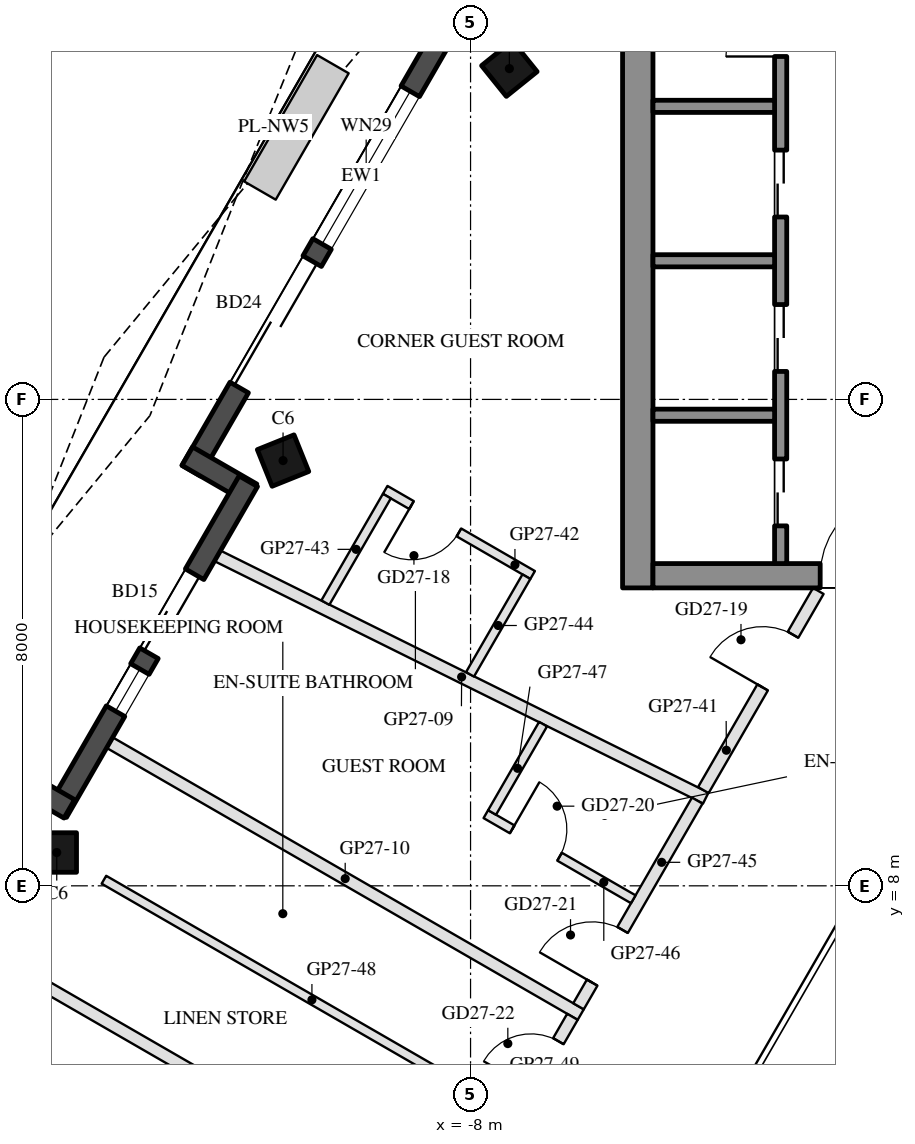
"""IFC4 building model, lengths in metres.
Left out: names, types, materials, properties, quantities, classifications, styles, units other than length and angle.
Written with IfcOpenShell. Run it as: python <this file> out.ifc"""

import sys

from ifc_helpers import new_model, si_unit, direction, frame, frame_2d, origin, origin_2d, place, context, subcontext, project, spatial, rectangle, hollow_rectangle, extrude, boolean, halfspace, element, fill, save


model = new_model("IFC4")
c1 = context("Model", 3, precision=1e-05, world=origin(), true_north=direction((0.0, 1.0)))
c2 = subcontext(c1, "Body", "Model", "MODEL_VIEW")
j1 = project(units=[si_unit("LENGTHUNIT", "METRE"), si_unit("PLANEANGLEUNIT", "RADIAN")], contexts=[c1])
p1 = place(None, origin())
s1 = spatial("IfcSite", under=j1, at=p1, CompositionType="ELEMENT")
p2 = place(p1, origin())
s2 = spatial("IfcBuilding", under=s1, at=p2, CompositionType="ELEMENT")
p3 = place(p2, frame((0.0, 0.0, 276.3)))
s3 = spatial("IfcBuildingStorey", under=s2, at=p3, CompositionType="ELEMENT", Elevation=276.3)
p4 = place(p3, frame((-7.362, 21.44, 0.0), z_axis=(0.06966478086, -0.179988931962, 0.981198656073), x_axis=(0.504437272402, 0.854926536661, 0.121010971086)))
e1 = element("IfcColumn", 1, at=p4, inside=s3, PredefinedType="COLUMN", context=c2, shape_type="SweptSolid", body=[
    boolean("DIFFERENCE", boolean("DIFFERENCE", extrude(hollow_rectangle(XDim=0.65, YDim=0.65, WallThickness=0.03, at=origin_2d()), origin(), (0.0, 0.0, 1.0), 3.771), halfspace(frame((0.0, 0.0, 0.047), z_axis=(0.0, 0.0, 1.0), x_axis=(1.0, 0.0, 0.0)), True)), halfspace(frame((0.0, 0.0, 3.724), z_axis=(0.0, 0.0, 1.0), x_axis=(1.0, 0.0, 0.0)), False)),
])
p5 = place(p3, frame((-11.083, 14.994, 0.0), z_axis=(0.100518021011, -0.128316722417, 0.98662604172), x_axis=(0.503129383785, 0.862065632243, 0.060857775822)))
e2 = element("IfcColumn", 2, at=p5, inside=s3, PredefinedType="COLUMN", context=c2, shape_type="SweptSolid", body=[
    boolean("DIFFERENCE", boolean("DIFFERENCE", extrude(hollow_rectangle(XDim=0.65, YDim=0.65, WallThickness=0.03, at=origin_2d()), origin(), (0.0, 0.0, 1.0), 3.75), halfspace(frame((0.0, 0.0, 0.04), z_axis=(0.0, 0.0, 1.0), x_axis=(1.0, 0.0, 0.0)), True)), halfspace(frame((0.0, 0.0, 3.71), z_axis=(0.0, 0.0, 1.0), x_axis=(1.0, 0.0, 0.0)), False)),
])
p6 = place(p3, frame((-14.805, 8.548, 0.0), z_axis=(0.131228839908, -0.075723997581, 0.988455799602), x_axis=(-0.499841813697, -0.866116713392, 7.933019e-06)))
e3 = element("IfcColumn", 3, at=p6, inside=s3, PredefinedType="COLUMN", context=c2, shape_type="SweptSolid", body=[
    boolean("DIFFERENCE", boolean("DIFFERENCE", extrude(hollow_rectangle(XDim=0.65, YDim=0.65, WallThickness=0.03, at=origin_2d()), origin(), (0.0, 0.0, 1.0), 3.743), halfspace(frame((0.0, 0.0, 0.037), z_axis=(0.0, 0.0, 1.0), x_axis=(1.0, 0.0, 0.0)), True)), halfspace(frame((0.0, 0.0, 3.706), z_axis=(0.0, 0.0, 1.0), x_axis=(1.0, 0.0, 0.0)), False)),
])
p7 = place(p3, frame((-7.002, 24.514, 0.0), z_axis=(0.0, 0.0, 1.0), x_axis=(-0.500000830309, -0.866024924405, 0.0)))
e4 = element("IfcWall", 4, at=p7, inside=s3, PredefinedType="SOLIDWALL", context=c2, shape_type="SweptSolid", body=[
    extrude(rectangle(XDim=11.185, YDim=0.35, at=frame_2d((5.593, 0.0))), origin(), (0.0, 0.0, 1.0), 3.55),
])
p8 = place(p7, frame((0.979, 0.0, 0.3)))
e5 = element("IfcOpeningElement", 5, at=p8, cuts=e4, PredefinedType="OPENING", context=c2, shape_type="SweptSolid", body=[
    extrude(rectangle(XDim=1.1, YDim=2.65, at=frame_2d((0.55, 1.325))), frame((0.0, 0.185, 0.0), z_axis=(0.0, -1.0, 0.0), x_axis=(1.0, 0.0, 0.0)), (0.0, 0.0, 1.0), 0.37),
])
p9 = place(p7, frame((7.205, 0.0, 0.0)))
e6 = element("IfcOpeningElement", 6, at=p9, cuts=e4, PredefinedType="OPENING", context=c2, shape_type="SweptSolid", body=[
    extrude(rectangle(XDim=2.4, YDim=2.4, at=frame_2d((1.2, 1.2))), frame((0.0, 0.185, 0.0), z_axis=(0.0, -1.0, 0.0), x_axis=(1.0, 0.0, 0.0)), (0.0, 0.0, 1.0), 0.37),
])
p10 = place(p7, frame((3.979, 0.0, 0.3)))
e7 = element("IfcOpeningElement", 7, at=p10, cuts=e4, PredefinedType="OPENING", context=c2, shape_type="SweptSolid", body=[
    extrude(rectangle(XDim=2.9, YDim=2.65, at=frame_2d((1.45, 1.325))), frame((0.0, 0.185, 0.0), z_axis=(0.0, -1.0, 0.0), x_axis=(1.0, 0.0, 0.0)), (0.0, 0.0, 1.0), 0.37),
])
p11 = place(p3, frame((-12.659, 15.066, 0.0), z_axis=(0.0, 0.0, 1.0), x_axis=(0.866005645448, -0.500034220881, 0.0)))
e8 = element("IfcWall", 8, at=p11, inside=s3, PredefinedType="SOLIDWALL", context=c2, shape_type="SweptSolid", body=[
    extrude(rectangle(XDim=1.22, YDim=0.35, at=frame_2d((0.61, 0.0))), origin(), (0.0, 0.0, 1.0), 3.55),
])
p12 = place(p3, frame((-11.655, 14.655, 0.0), z_axis=(0.0, 0.0, 1.0), x_axis=(-0.499995993298, -0.866027717042, 0.0)))
e9 = element("IfcWall", 9, at=p12, inside=s3, PredefinedType="SOLIDWALL", context=c2, shape_type="SweptSolid", body=[
    extrude(rectangle(XDim=6.284, YDim=0.35, at=frame_2d((3.142, 0.0))), origin(), (0.0, 0.0, 1.0), 3.55),
])
p13 = place(p12, frame((1.767, 0.0, 0.0)))
e10 = element("IfcOpeningElement", 10, at=p13, cuts=e9, PredefinedType="OPENING", context=c2, shape_type="SweptSolid", body=[
    extrude(rectangle(XDim=1.5, YDim=2.4, at=frame_2d((0.75, 1.2))), frame((0.0, 0.185, 0.0), z_axis=(0.0, -1.0, 0.0), x_axis=(1.0, 0.0, 0.0)), (0.0, 0.0, 1.0), 0.37),
])
p14 = place(p12, frame((3.566, 0.0, 0.3)))
e11 = element("IfcOpeningElement", 11, at=p14, cuts=e9, PredefinedType="OPENING", context=c2, shape_type="SweptSolid", body=[
    extrude(rectangle(XDim=0.8, YDim=2.65, at=frame_2d((0.4, 1.325))), frame((0.0, 0.185, 0.0), z_axis=(0.0, -1.0, 0.0), x_axis=(1.0, 0.0, 0.0)), (0.0, 0.0, 1.0), 0.37),
])
p15 = place(p3, frame((-14.599, 9.266, 0.0), z_axis=(0.0, 0.0, 1.0), x_axis=(-0.866005645448, 0.500034220881, 0.0)))
e12 = element("IfcWall", 12, at=p15, inside=s3, PredefinedType="SOLIDWALL", context=c2, shape_type="SweptSolid", body=[
    extrude(rectangle(XDim=1.22, YDim=0.35, at=frame_2d((0.61, 0.0))), origin(), (0.0, 0.0, 1.0), 3.55),
])
p16 = place(p3, frame((-5.25, 12.9, 0.0), z_axis=(0.0, 0.0, 1.0), x_axis=(0.0, 1.0, 0.0)))
e13 = element("IfcWall", 13, at=p16, inside=s3, PredefinedType="SHEAR", context=c2, shape_type="SweptSolid", body=[
    extrude(rectangle(XDim=13.031, YDim=0.5, at=frame_2d((6.516, 0.0))), origin(), (0.0, 0.0, 1.0), 3.5),
])
p17 = place(p3, frame((5.0, 13.1, 0.0), z_axis=(0.0, 0.0, 1.0), x_axis=(-1.0, 0.0, 0.0)))
e14 = element("IfcWall", 14, at=p17, inside=s3, PredefinedType="SHEAR", context=c2, shape_type="SweptSolid", body=[
    extrude(rectangle(XDim=10.0, YDim=0.4, at=frame_2d((5.0, 0.0))), origin(), (0.0, 0.0, 1.0), 3.5),
])
p18 = place(p17, frame((3.55, 0.0, 0.0)))
e15 = element("IfcOpeningElement", 15, at=p18, cuts=e14, PredefinedType="OPENING", context=c2, shape_type="SweptSolid", body=[
    extrude(rectangle(XDim=1.1, YDim=2.1, at=frame_2d((0.55, 1.05))), frame((0.0, 0.21, 0.0), z_axis=(0.0, -1.0, 0.0), x_axis=(1.0, 0.0, 0.0)), (0.0, 0.0, 1.0), 0.42),
])
p19 = place(p17, frame((5.85, 0.0, 0.0)))
e16 = element("IfcOpeningElement", 16, at=p19, cuts=e14, PredefinedType="OPENING", context=c2, shape_type="SweptSolid", body=[
    extrude(rectangle(XDim=1.4, YDim=2.1, at=frame_2d((0.7, 1.05))), frame((0.0, 0.21, 0.0), z_axis=(0.0, -1.0, 0.0), x_axis=(1.0, 0.0, 0.0)), (0.0, 0.0, 1.0), 0.42),
])
p20 = place(p3, frame((-2.9, 13.3, 0.0), z_axis=(0.0, 0.0, 1.0), x_axis=(0.0, 1.0, 0.0)))
e17 = element("IfcWall", 17, at=p20, inside=s3, PredefinedType="SHEAR", context=c2, shape_type="SweptSolid", body=[
    extrude(rectangle(XDim=10.16, YDim=0.2, at=frame_2d((5.08, 0.0))), origin(), (0.0, 0.0, 1.0), 3.5),
])
p21 = place(p20, frame((0.62, 0.0, 0.0)))
e18 = element("IfcOpeningElement", 18, at=p21, cuts=e17, PredefinedType="OPENING", context=c2, shape_type="SweptSolid", body=[
    extrude(rectangle(XDim=1.1, YDim=2.1, at=frame_2d((0.55, 1.05))), frame((0.0, 0.11, 0.0), z_axis=(0.0, -1.0, 0.0), x_axis=(1.0, 0.0, 0.0)), (0.0, 0.0, 1.0), 0.22),
])
p22 = place(p20, frame((3.16, 0.0, 0.0)))
e19 = element("IfcOpeningElement", 19, at=p22, cuts=e17, PredefinedType="OPENING", context=c2, shape_type="SweptSolid", body=[
    extrude(rectangle(XDim=1.1, YDim=2.1, at=frame_2d((0.55, 1.05))), frame((0.0, 0.11, 0.0), z_axis=(0.0, -1.0, 0.0), x_axis=(1.0, 0.0, 0.0)), (0.0, 0.0, 1.0), 0.22),
])
p23 = place(p20, frame((5.7, 0.0, 0.0)))
e20 = element("IfcOpeningElement", 20, at=p23, cuts=e17, PredefinedType="OPENING", context=c2, shape_type="SweptSolid", body=[
    extrude(rectangle(XDim=1.1, YDim=2.1, at=frame_2d((0.55, 1.05))), frame((0.0, 0.11, 0.0), z_axis=(0.0, -1.0, 0.0), x_axis=(1.0, 0.0, 0.0)), (0.0, 0.0, 1.0), 0.22),
])
p24 = place(p20, frame((8.34, 0.0, 0.0)))
e21 = element("IfcOpeningElement", 21, at=p24, cuts=e17, PredefinedType="OPENING", context=c2, shape_type="SweptSolid", body=[
    extrude(rectangle(XDim=0.9, YDim=2.1, at=frame_2d((0.45, 1.05))), frame((0.0, 0.11, 0.0), z_axis=(0.0, -1.0, 0.0), x_axis=(1.0, 0.0, 0.0)), (0.0, 0.0, 1.0), 0.22),
])
for number, where, z_axis, x_axis in (
    (22, (-3.0, 15.74, 0.0), (0.0, 0.0, 1.0), (-1.0, 0.0, 0.0)),
    (23, (-3.0, 18.28, 0.0), (0.0, 0.0, 1.0), (-1.0, 0.0, 0.0)),
    (24, (-3.0, 20.82, 0.0), (0.0, 0.0, 1.0), (-1.0, 0.0, 0.0)),
):
    element("IfcWall", number, at=place(p3, frame(where, z_axis=z_axis, x_axis=x_axis)), inside=s3, PredefinedType="SHEAR", context=c2, shape_type="SweptSolid", body=[
        extrude(rectangle(XDim=2.0, YDim=0.2, at=frame_2d((1.0, 0.0))), origin(), (0.0, 0.0, 1.0), 3.5),
    ])
p25 = place(p3, frame((-12.162, 13.427, 0.0), z_axis=(0.0, 0.0, 1.0), x_axis=(0.895849808174, -0.444356974959, 0.0)))
e25 = element("IfcWall", 25, at=p25, inside=s3, PredefinedType="PARTITIONING", context=c2, shape_type="SweptSolid", body=[
    extrude(rectangle(XDim=8.964, YDim=0.2, at=frame_2d((4.482, 0.0))), origin(), (0.0, 0.0, 1.0), 3.1),
])
p26 = place(p3, frame((-13.935, 10.355, 0.0), z_axis=(0.0, 0.0, 1.0), x_axis=(0.866026066645, -0.499998851889, 0.0)))
e26 = element("IfcWall", 26, at=p26, inside=s3, PredefinedType="PARTITIONING", context=c2, shape_type="SweptSolid", body=[
    extrude(rectangle(XDim=8.946, YDim=0.2, at=frame_2d((4.473, 0.0))), origin(), (0.0, 0.0, 1.0), 3.1),
])
p27 = place(p3, frame((-16.715, 7.341, 0.0), z_axis=(0.0, 0.0, 1.0), x_axis=(0.866024954444, -0.500000778279, 0.0)))
e27 = element("IfcWall", 27, at=p27, inside=s3, PredefinedType="PARTITIONING", context=c2, shape_type="SweptSolid", body=[
    extrude(rectangle(XDim=9.846, YDim=0.2, at=frame_2d((4.923, 0.0))), origin(), (0.0, 0.0, 1.0), 3.1),
])
p28 = place(p3, frame((-4.171, 9.575, 0.0), z_axis=(0.0, 0.0, 1.0), x_axis=(0.49999255039, 0.866029704776, 0.0)))
e28 = element("IfcWall", 28, at=p28, inside=s3, PredefinedType="PARTITIONING", context=c2, shape_type="SweptSolid", body=[
    extrude(rectangle(XDim=3.782, YDim=0.2, at=frame_2d((1.891, 0.0))), origin(), (0.0, 0.0, 1.0), 3.05),
])
p29 = place(p28, frame((1.95, 0.0, 0.0)))
e29 = element("IfcOpeningElement", 29, at=p29, cuts=e28, PredefinedType="OPENING", context=c2, shape_type="SweptSolid", body=[
    extrude(rectangle(XDim=1.0, YDim=2.1, at=frame_2d((0.5, 1.05))), frame((0.0, 0.11, 0.0), z_axis=(0.0, -1.0, 0.0), x_axis=(1.0, 0.0, 0.0)), (0.0, 0.0, 1.0), 0.22),
])
p30 = place(p3, frame((-6.979, 13.112, 0.0), z_axis=(0.0, 0.0, 1.0), x_axis=(-0.865996816683, 0.500049511043, 0.0)))
e30 = element("IfcWall", 30, at=p30, inside=s3, PredefinedType="PARTITIONING", context=c2, shape_type="SweptSolid", body=[
    extrude(rectangle(XDim=2.8, YDim=0.15, at=frame_2d((1.4, 0.0))), origin(), (0.0, 0.0, 1.0), 3.55),
])
p31 = place(p30, frame((1.4, 0.0, 0.0)))
e31 = element("IfcOpeningElement", 31, at=p31, cuts=e30, PredefinedType="OPENING", context=c2, shape_type="SweptSolid", body=[
    extrude(rectangle(XDim=0.9, YDim=2.1, at=frame_2d((0.45, 1.05))), frame((0.0, 0.085, 0.0), z_axis=(0.0, -1.0, 0.0), x_axis=(1.0, 0.0, 0.0)), (0.0, 0.0, 1.0), 0.17),
])
p32 = place(p3, frame((-9.376, 14.41, 0.0), z_axis=(0.0, 0.0, 1.0), x_axis=(-0.499917528438, -0.866073013527, 0.0)))
e32 = element("IfcWall", 32, at=p32, inside=s3, PredefinedType="PARTITIONING", context=c2, shape_type="SweptSolid", body=[
    extrude(rectangle(XDim=2.022, YDim=0.15, at=frame_2d((1.011, 0.0))), origin(), (0.0, 0.0, 1.0), 3.05),
])
p33 = place(p3, frame((-7.081, 13.085, 0.0), z_axis=(0.0, 0.0, 1.0), x_axis=(-0.500060473882, -0.865990486357, 0.0)))
e33 = element("IfcWall", 33, at=p33, inside=s3, PredefinedType="PARTITIONING", context=c2, shape_type="SweptSolid", body=[
    extrude(rectangle(XDim=1.855, YDim=0.15, at=frame_2d((0.927, 0.0))), origin(), (0.0, 0.0, 1.0), 3.05),
])
p34 = place(p3, frame((-6.225, 6.019, 0.0), z_axis=(0.0, 0.0, 1.0), x_axis=(0.500011000363, 0.866019052629, 0.0)))
e34 = element("IfcWall", 34, at=p34, inside=s3, PredefinedType="PARTITIONING", context=c2, shape_type="SweptSolid", body=[
    extrude(rectangle(XDim=3.906, YDim=0.2, at=frame_2d((1.953, 0.0))), origin(), (0.0, 0.0, 1.0), 3.05),
])
p35 = place(p34, frame((0.45, 0.0, 0.0)))
e35 = element("IfcOpeningElement", 35, at=p35, cuts=e34, PredefinedType="OPENING", context=c2, shape_type="SweptSolid", body=[
    extrude(rectangle(XDim=1.0, YDim=2.1, at=frame_2d((0.5, 1.05))), frame((0.0, 0.11, 0.0), z_axis=(0.0, -1.0, 0.0), x_axis=(1.0, 0.0, 0.0)), (0.0, 0.0, 1.0), 0.22),
])
p36 = place(p3, frame((-7.749, 9.179, 0.0), z_axis=(0.0, 0.0, 1.0), x_axis=(0.866018616679, -0.500011755427, 0.0)))
e36 = element("IfcWall", 36, at=p36, inside=s3, PredefinedType="PARTITIONING", context=c2, shape_type="SweptSolid", body=[
    extrude(rectangle(XDim=2.8, YDim=0.15, at=frame_2d((1.4, 0.0))), origin(), (0.0, 0.0, 1.0), 3.55),
])
p37 = place(p36, frame((0.5, 0.0, 0.0)))
e37 = element("IfcOpeningElement", 37, at=p37, cuts=e36, PredefinedType="OPENING", context=c2, shape_type="SweptSolid", body=[
    extrude(rectangle(XDim=0.9, YDim=2.1, at=frame_2d((0.45, 1.05))), frame((0.0, 0.085, 0.0), z_axis=(0.0, -1.0, 0.0), x_axis=(1.0, 0.0, 0.0)), (0.0, 0.0, 1.0), 0.17),
])
p38 = place(p3, frame((-6.807, 10.659, 0.0), z_axis=(0.0, 0.0, 1.0), x_axis=(-0.500020578564, -0.866013522419, 0.0)))
e38 = element("IfcWall", 38, at=p38, inside=s3, PredefinedType="PARTITIONING", context=c2, shape_type="SweptSolid", body=[
    extrude(rectangle(XDim=1.678, YDim=0.15, at=frame_2d((0.839, 0.0))), origin(), (0.0, 0.0, 1.0), 3.55),
])
p39 = place(p3, frame((-14.03, 8.1, 0.0), z_axis=(0.0, 0.0, 1.0), x_axis=(0.866013180616, -0.500021170551, 0.0)))
e39 = element("IfcWall", 39, at=p39, inside=s3, PredefinedType="PARTITIONING", context=c2, shape_type="SweptSolid", body=[
    extrude(rectangle(XDim=7.9, YDim=0.15, at=frame_2d((3.95, 0.0))), origin(), (0.0, 0.0, 1.0), 3.05),
])
p40 = place(p3, frame((-7.237, 4.265, 0.0), z_axis=(0.0, 0.0, 1.0), x_axis=(0.499923179218, 0.866069751741, 0.0)))
e40 = element("IfcWall", 40, at=p40, inside=s3, PredefinedType="PARTITIONING", context=c2, shape_type="SweptSolid", body=[
    extrude(rectangle(XDim=1.825, YDim=0.2, at=frame_2d((0.913, 0.0))), origin(), (0.0, 0.0, 1.0), 3.05),
])
p41 = place(p40, frame((0.462, 0.0, 0.0)))
e41 = element("IfcOpeningElement", 41, at=p41, cuts=e40, PredefinedType="OPENING", context=c2, shape_type="SweptSolid", body=[
    extrude(rectangle(XDim=0.9, YDim=2.1, at=frame_2d((0.45, 1.05))), frame((0.0, 0.11, 0.0), z_axis=(0.0, -1.0, 0.0), x_axis=(1.0, 0.0, 0.0)), (0.0, 0.0, 1.0), 0.22),
])
p42 = place(p9, frame((2.4, 0.0, 0.0), z_axis=(0.0, 0.0, 1.0), x_axis=(-1.0, 0.0, 0.0)))
e42 = element("IfcDoor", 42, at=p42, inside=s3, OperationType="SLIDING_TO_LEFT", PredefinedType="DOOR", context=c2, shape_type="SweptSolid", body=[
    extrude(rectangle(XDim=2.4, YDim=2.4, at=frame_2d((1.2, 1.2))), frame((0.0, 0.025, 0.0), z_axis=(0.0, -1.0, 0.0), x_axis=(1.0, 0.0, 0.0)), (0.0, 0.0, 1.0), 0.05),
])
fill(e6, e42)
p43 = place(p10, origin())
e43 = element("IfcWindow", 43, at=p43, inside=s3, PartitioningType="SINGLE_PANEL", PredefinedType="WINDOW", context=c2, shape_type="SweptSolid", body=[
    extrude(rectangle(XDim=2.9, YDim=2.65, at=frame_2d((1.45, 1.325))), frame((0.0, 0.03, 0.0), z_axis=(0.0, -1.0, 0.0), x_axis=(1.0, 0.0, 0.0)), (0.0, 0.0, 1.0), 0.06),
])
fill(e7, e43)
p44 = place(p13, frame((1.5, 0.0, 0.0), z_axis=(0.0, 0.0, 1.0), x_axis=(-1.0, 0.0, 0.0)))
e44 = element("IfcDoor", 44, at=p44, inside=s3, OperationType="SLIDING_TO_LEFT", PredefinedType="DOOR", context=c2, shape_type="SweptSolid", body=[
    extrude(rectangle(XDim=1.5, YDim=2.4, at=frame_2d((0.75, 1.2))), frame((0.0, 0.025, 0.0), z_axis=(0.0, -1.0, 0.0), x_axis=(1.0, 0.0, 0.0)), (0.0, 0.0, 1.0), 0.05),
])
fill(e10, e44)
p45 = place(p14, origin())
e45 = element("IfcWindow", 45, at=p45, inside=s3, PartitioningType="SINGLE_PANEL", PredefinedType="WINDOW", context=c2, shape_type="SweptSolid", body=[
    extrude(rectangle(XDim=0.8, YDim=2.65, at=frame_2d((0.4, 1.325))), frame((0.0, 0.03, 0.0), z_axis=(0.0, -1.0, 0.0), x_axis=(1.0, 0.0, 0.0)), (0.0, 0.0, 1.0), 0.06),
])
fill(e11, e45)
p46 = place(p21, origin())
e46 = element("IfcDoor", 46, at=p46, inside=s3, OperationType="DOUBLE_DOOR_SLIDING", PredefinedType="DOOR", context=c2, shape_type="SweptSolid", body=[
    extrude(rectangle(XDim=1.1, YDim=2.1, at=frame_2d((0.55, 1.05))), frame((0.0, 0.025, 0.0), z_axis=(0.0, -1.0, 0.0), x_axis=(1.0, 0.0, 0.0)), (0.0, 0.0, 1.0), 0.05),
])
fill(e18, e46)
p47 = place(p22, origin())
e47 = element("IfcDoor", 47, at=p47, inside=s3, OperationType="DOUBLE_DOOR_SLIDING", PredefinedType="DOOR", context=c2, shape_type="SweptSolid", body=[
    extrude(rectangle(XDim=1.1, YDim=2.1, at=frame_2d((0.55, 1.05))), frame((0.0, 0.025, 0.0), z_axis=(0.0, -1.0, 0.0), x_axis=(1.0, 0.0, 0.0)), (0.0, 0.0, 1.0), 0.05),
])
fill(e19, e47)
p48 = place(p23, origin())
e48 = element("IfcDoor", 48, at=p48, inside=s3, OperationType="DOUBLE_DOOR_SLIDING", PredefinedType="DOOR", context=c2, shape_type="SweptSolid", body=[
    extrude(rectangle(XDim=1.1, YDim=2.1, at=frame_2d((0.55, 1.05))), frame((0.0, 0.025, 0.0), z_axis=(0.0, -1.0, 0.0), x_axis=(1.0, 0.0, 0.0)), (0.0, 0.0, 1.0), 0.05),
])
fill(e20, e48)
p49 = place(p24, origin())
e49 = element("IfcDoor", 49, at=p49, inside=s3, OperationType="SINGLE_SWING_LEFT", PredefinedType="DOOR", context=c2, shape_type="SweptSolid", body=[
    extrude(rectangle(XDim=0.9, YDim=2.1, at=frame_2d((0.45, 1.05))), frame((0.0, 0.025, 0.0), z_axis=(0.0, -1.0, 0.0), x_axis=(1.0, 0.0, 0.0)), (0.0, 0.0, 1.0), 0.05),
])
fill(e21, e49)
p50 = place(p19, frame((1.4, 0.0, 0.0), z_axis=(0.0, 0.0, 1.0), x_axis=(-1.0, 0.0, 0.0)))
e50 = element("IfcDoor", 50, at=p50, inside=s3, OperationType="DOUBLE_DOOR_SINGLE_SWING", PredefinedType="DOOR", context=c2, shape_type="SweptSolid", body=[
    extrude(rectangle(XDim=1.4, YDim=2.1, at=frame_2d((0.7, 1.05))), frame((0.0, 0.025, 0.0), z_axis=(0.0, -1.0, 0.0), x_axis=(1.0, 0.0, 0.0)), (0.0, 0.0, 1.0), 0.05),
])
fill(e16, e50)
p51 = place(p31, origin())
e51 = element("IfcDoor", 51, at=p51, inside=s3, OperationType="SINGLE_SWING_RIGHT", PredefinedType="DOOR", context=c2, shape_type="SweptSolid", body=[
    extrude(rectangle(XDim=0.9, YDim=2.1, at=frame_2d((0.45, 1.05))), frame((0.0, 0.025, 0.0), z_axis=(0.0, -1.0, 0.0), x_axis=(1.0, 0.0, 0.0)), (0.0, 0.0, 1.0), 0.05),
])
fill(e31, e51)
p52 = place(p29, origin())
e52 = element("IfcDoor", 52, at=p52, inside=s3, OperationType="SINGLE_SWING_LEFT", PredefinedType="DOOR", context=c2, shape_type="SweptSolid", body=[
    extrude(rectangle(XDim=1.0, YDim=2.1, at=frame_2d((0.5, 1.05))), frame((0.0, 0.025, 0.0), z_axis=(0.0, -1.0, 0.0), x_axis=(1.0, 0.0, 0.0)), (0.0, 0.0, 1.0), 0.05),
])
fill(e29, e52)
p53 = place(p37, origin())
e53 = element("IfcDoor", 53, at=p53, inside=s3, OperationType="SINGLE_SWING_LEFT", PredefinedType="DOOR", context=c2, shape_type="SweptSolid", body=[
    extrude(rectangle(XDim=0.9, YDim=2.1, at=frame_2d((0.45, 1.05))), frame((0.0, 0.025, 0.0), z_axis=(0.0, -1.0, 0.0), x_axis=(1.0, 0.0, 0.0)), (0.0, 0.0, 1.0), 0.05),
])
fill(e37, e53)
p54 = place(p35, origin())
e54 = element("IfcDoor", 54, at=p54, inside=s3, OperationType="SINGLE_SWING_LEFT", PredefinedType="DOOR", context=c2, shape_type="SweptSolid", body=[
    extrude(rectangle(XDim=1.0, YDim=2.1, at=frame_2d((0.5, 1.05))), frame((0.0, 0.025, 0.0), z_axis=(0.0, -1.0, 0.0), x_axis=(1.0, 0.0, 0.0)), (0.0, 0.0, 1.0), 0.05),
])
fill(e35, e54)
p55 = place(p41, origin())
e55 = element("IfcDoor", 55, at=p55, inside=s3, OperationType="SINGLE_SWING_LEFT", PredefinedType="DOOR", context=c2, shape_type="SweptSolid", body=[
    extrude(rectangle(XDim=0.9, YDim=2.1, at=frame_2d((0.45, 1.05))), frame((0.0, 0.025, 0.0), z_axis=(0.0, -1.0, 0.0), x_axis=(1.0, 0.0, 0.0)), (0.0, 0.0, 1.0), 0.05),
])
fill(e41, e55)
save(model, sys.argv[1])
